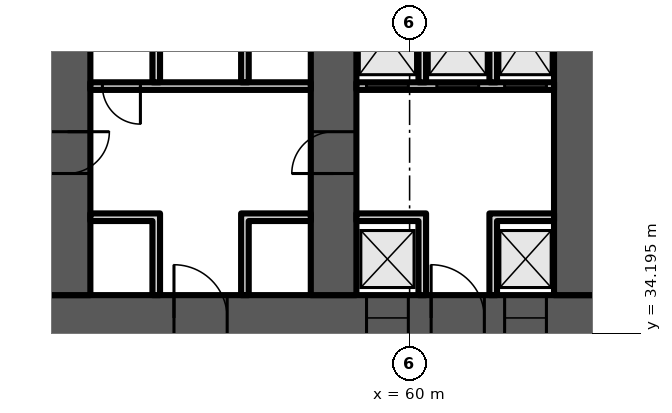
"""IFC4 building model, lengths in metres.
Left out: names, types, materials, properties, quantities, classifications, styles, units other than length and angle.
Written with IfcOpenShell. Run it as: python <this file> out.ifc"""

import sys

from ifc_helpers import new_model, si_unit, direction, frame, frame_2d, origin, place, context, subcontext, project, spatial, polyline, rectangle, outline, extrude, element, fill, save


model = new_model("IFC4")
c1 = context("Model", 3, precision=1e-05, world=origin(), true_north=direction((0.0, 1.0)))
c2 = subcontext(c1, "Body", "Model", "MODEL_VIEW")
j1 = project(units=[si_unit("LENGTHUNIT", "METRE"), si_unit("PLANEANGLEUNIT", "RADIAN")], contexts=[c1])
p1 = place(None, origin())
s1 = spatial("IfcSite", under=j1, at=p1, CompositionType="ELEMENT")
p2 = place(p1, origin())
s2 = spatial("IfcBuilding", under=s1, at=p2, CompositionType="ELEMENT")
p3 = place(p2, frame((0.0, 0.0, 55.9)))
s3 = spatial("IfcBuildingStorey", under=s2, at=p3, CompositionType="ELEMENT", Elevation=55.9)
p4 = place(p3, frame((9.0, 34.6, 0.0), z_axis=(0.0, 0.0, 1.0), x_axis=(1.0, 0.0, 0.0)))
e1 = element("IfcWall", 1, at=p4, inside=s3, PredefinedType="SHEAR", context=c2, shape_type="SweptSolid", body=[
    extrude(rectangle(XDim=56.0, YDim=1.2, at=frame_2d((28.0, 0.0))), origin(), (0.0, 0.0, 1.0), 3.6),
])
p5 = place(p4, frame((3.3, 0.0, 0.0)))
e2 = element("IfcOpeningElement", 2, at=p5, cuts=e1, PredefinedType="OPENING", context=c2, shape_type="SweptSolid", body=[
    extrude(rectangle(XDim=1.0, YDim=2.1, at=frame_2d((0.5, 1.05))), frame((0.0, 0.61, 0.0), z_axis=(0.0, -1.0, 0.0), x_axis=(1.0, 0.0, 0.0)), (0.0, 0.0, 1.0), 1.22),
])
p6 = place(p4, frame((7.867, 0.0, 0.0)))
e3 = element("IfcOpeningElement", 3, at=p6, cuts=e1, PredefinedType="OPENING", context=c2, shape_type="SweptSolid", body=[
    extrude(rectangle(XDim=1.1, YDim=2.1, at=frame_2d((0.55, 1.05))), frame((0.0, 0.61, 0.0), z_axis=(0.0, -1.0, 0.0), x_axis=(1.0, 0.0, 0.0)), (0.0, 0.0, 1.0), 1.22),
])
p7 = place(p4, frame((12.033, 0.0, 0.0)))
e4 = element("IfcOpeningElement", 4, at=p7, cuts=e1, PredefinedType="OPENING", context=c2, shape_type="SweptSolid", body=[
    extrude(rectangle(XDim=1.1, YDim=2.1, at=frame_2d((0.55, 1.05))), frame((0.0, 0.61, 0.0), z_axis=(0.0, -1.0, 0.0), x_axis=(1.0, 0.0, 0.0)), (0.0, 0.0, 1.0), 1.22),
])
p8 = place(p4, frame((9.8, 0.0, 0.0)))
e5 = element("IfcOpeningElement", 5, at=p8, cuts=e1, PredefinedType="OPENING", context=c2, shape_type="SweptSolid", body=[
    extrude(rectangle(XDim=1.4, YDim=2.1, at=frame_2d((0.7, 1.05))), frame((0.0, 0.61, 0.0), z_axis=(0.0, -1.0, 0.0), x_axis=(1.0, 0.0, 0.0)), (0.0, 0.0, 1.0), 1.22),
])
p9 = place(p4, frame((14.65, 0.0, 0.0)))
e6 = element("IfcOpeningElement", 6, at=p9, cuts=e1, PredefinedType="OPENING", context=c2, shape_type="SweptSolid", body=[
    extrude(rectangle(XDim=1.2, YDim=2.1, at=frame_2d((0.6, 1.05))), frame((0.0, 0.61, 0.0), z_axis=(0.0, -1.0, 0.0), x_axis=(1.0, 0.0, 0.0)), (0.0, 0.0, 1.0), 1.22),
])
p10 = place(p4, frame((21.867, 0.0, 0.0)))
e7 = element("IfcOpeningElement", 7, at=p10, cuts=e1, PredefinedType="OPENING", context=c2, shape_type="SweptSolid", body=[
    extrude(rectangle(XDim=1.1, YDim=2.1, at=frame_2d((0.55, 1.05))), frame((0.0, 0.61, 0.0), z_axis=(0.0, -1.0, 0.0), x_axis=(1.0, 0.0, 0.0)), (0.0, 0.0, 1.0), 1.22),
])
p11 = place(p4, frame((26.033, 0.0, 0.0)))
e8 = element("IfcOpeningElement", 8, at=p11, cuts=e1, PredefinedType="OPENING", context=c2, shape_type="SweptSolid", body=[
    extrude(rectangle(XDim=1.1, YDim=2.1, at=frame_2d((0.55, 1.05))), frame((0.0, 0.61, 0.0), z_axis=(0.0, -1.0, 0.0), x_axis=(1.0, 0.0, 0.0)), (0.0, 0.0, 1.0), 1.22),
])
p12 = place(p4, frame((23.8, 0.0, 0.0)))
e9 = element("IfcOpeningElement", 9, at=p12, cuts=e1, PredefinedType="OPENING", context=c2, shape_type="SweptSolid", body=[
    extrude(rectangle(XDim=1.4, YDim=2.1, at=frame_2d((0.7, 1.05))), frame((0.0, 0.61, 0.0), z_axis=(0.0, -1.0, 0.0), x_axis=(1.0, 0.0, 0.0)), (0.0, 0.0, 1.0), 1.22),
])
p13 = place(p4, frame((28.867, 0.0, 0.0)))
e10 = element("IfcOpeningElement", 10, at=p13, cuts=e1, PredefinedType="OPENING", context=c2, shape_type="SweptSolid", body=[
    extrude(rectangle(XDim=1.1, YDim=2.1, at=frame_2d((0.55, 1.05))), frame((0.0, 0.61, 0.0), z_axis=(0.0, -1.0, 0.0), x_axis=(1.0, 0.0, 0.0)), (0.0, 0.0, 1.0), 1.22),
])
p14 = place(p4, frame((33.033, 0.0, 0.0)))
e11 = element("IfcOpeningElement", 11, at=p14, cuts=e1, PredefinedType="OPENING", context=c2, shape_type="SweptSolid", body=[
    extrude(rectangle(XDim=1.1, YDim=2.1, at=frame_2d((0.55, 1.05))), frame((0.0, 0.61, 0.0), z_axis=(0.0, -1.0, 0.0), x_axis=(1.0, 0.0, 0.0)), (0.0, 0.0, 1.0), 1.22),
])
p15 = place(p4, frame((40.15, 0.0, 0.0)))
e12 = element("IfcOpeningElement", 12, at=p15, cuts=e1, PredefinedType="OPENING", context=c2, shape_type="SweptSolid", body=[
    extrude(rectangle(XDim=1.2, YDim=2.1, at=frame_2d((0.6, 1.05))), frame((0.0, 0.61, 0.0), z_axis=(0.0, -1.0, 0.0), x_axis=(1.0, 0.0, 0.0)), (0.0, 0.0, 1.0), 1.22),
])
p16 = place(p4, frame((44.8, 0.0, 0.0)))
e13 = element("IfcOpeningElement", 13, at=p16, cuts=e1, PredefinedType="OPENING", context=c2, shape_type="SweptSolid", body=[
    extrude(rectangle(XDim=1.4, YDim=2.1, at=frame_2d((0.7, 1.05))), frame((0.0, 0.61, 0.0), z_axis=(0.0, -1.0, 0.0), x_axis=(1.0, 0.0, 0.0)), (0.0, 0.0, 1.0), 1.22),
])
p17 = place(p4, frame((49.867, 0.0, 0.0)))
e14 = element("IfcOpeningElement", 14, at=p17, cuts=e1, PredefinedType="OPENING", context=c2, shape_type="SweptSolid", body=[
    extrude(rectangle(XDim=1.1, YDim=2.1, at=frame_2d((0.55, 1.05))), frame((0.0, 0.61, 0.0), z_axis=(0.0, -1.0, 0.0), x_axis=(1.0, 0.0, 0.0)), (0.0, 0.0, 1.0), 1.22),
])
p18 = place(p4, frame((53.5, 0.0, 0.0)))
e15 = element("IfcOpeningElement", 15, at=p18, cuts=e1, PredefinedType="OPENING", context=c2, shape_type="SweptSolid", body=[
    extrude(rectangle(XDim=1.1, YDim=2.1, at=frame_2d((0.55, 1.05))), frame((0.0, 0.61, 0.0), z_axis=(0.0, -1.0, 0.0), x_axis=(1.0, 0.0, 0.0)), (0.0, 0.0, 1.0), 1.22),
])
p19 = place(p4, frame((51.567, 0.0, 0.0)))
e16 = element("IfcOpeningElement", 16, at=p19, cuts=e1, PredefinedType="OPENING", context=c2, shape_type="SweptSolid", body=[
    extrude(rectangle(XDim=1.4, YDim=2.1, at=frame_2d((0.7, 1.05))), frame((0.0, 0.61, 0.0), z_axis=(0.0, -1.0, 0.0), x_axis=(1.0, 0.0, 0.0)), (0.0, 0.0, 1.0), 1.22),
])
p20 = place(p3, frame((51.0, 35.2, 0.0), z_axis=(0.0, 0.0, 1.0), x_axis=(0.0, 1.0, 0.0)))
e17 = element("IfcWall", 17, at=p20, inside=s3, PredefinedType="SHEAR", context=c2, shape_type="SweptSolid", body=[
    extrude(rectangle(XDim=13.555, YDim=1.2, at=frame_2d((6.778, 0.0))), origin(), (0.0, 0.0, 1.0), 3.6),
])
p21 = place(p20, frame((3.2, 0.0, 0.0)))
e18 = element("IfcOpeningElement", 18, at=p21, cuts=e17, PredefinedType="OPENING", context=c2, shape_type="SweptSolid", body=[
    extrude(rectangle(XDim=1.1, YDim=2.1, at=frame_2d((0.55, 1.05))), frame((0.0, 0.61, 0.0), z_axis=(0.0, -1.0, 0.0), x_axis=(1.0, 0.0, 0.0)), (0.0, 0.0, 1.0), 1.22),
])
p22 = place(p3, frame((58.0, 35.2, 0.0), z_axis=(0.0, 0.0, 1.0), x_axis=(0.0, 1.0, 0.0)))
e19 = element("IfcWall", 19, at=p22, inside=s3, PredefinedType="SHEAR", context=c2, shape_type="SweptSolid", body=[
    extrude(rectangle(XDim=12.943, YDim=1.2, at=frame_2d((6.471, 0.0))), origin(), (0.0, 0.0, 1.0), 3.6),
])
p23 = place(p22, frame((10.134, 0.0, 0.0)))
e20 = element("IfcOpeningElement", 20, at=p23, cuts=e19, PredefinedType="OPENING", context=c2, shape_type="SweptSolid", body=[
    extrude(rectangle(XDim=1.0, YDim=2.1, at=frame_2d((0.5, 1.05))), frame((0.0, 0.61, 0.0), z_axis=(0.0, -1.0, 0.0), x_axis=(1.0, 0.0, 0.0)), (0.0, 0.0, 1.0), 1.22),
])
p24 = place(p22, frame((3.2, 0.0, 0.0)))
e21 = element("IfcOpeningElement", 21, at=p24, cuts=e19, PredefinedType="OPENING", context=c2, shape_type="SweptSolid", body=[
    extrude(rectangle(XDim=1.1, YDim=2.1, at=frame_2d((0.55, 1.05))), frame((0.0, 0.61, 0.0), z_axis=(0.0, -1.0, 0.0), x_axis=(1.0, 0.0, 0.0)), (0.0, 0.0, 1.0), 1.22),
])
p25 = place(p3, frame((64.4, 35.2, 0.0), z_axis=(0.0, 0.0, 1.0), x_axis=(0.0, 1.0, 0.0)))
e22 = element("IfcWall", 22, at=p25, inside=s3, PredefinedType="SHEAR", context=c2, shape_type="SweptSolid", body=[
    extrude(rectangle(XDim=12.383, YDim=1.2, at=frame_2d((6.191, 0.0))), origin(), (0.0, 0.0, 1.0), 3.6),
])
p26 = place(p3, frame((51.6, 40.7, 0.0), z_axis=(0.0, 0.0, 1.0), x_axis=(1.0, 0.0, 0.0)))
e23 = element("IfcWall", 23, at=p26, inside=s3, PredefinedType="PARTITIONING", context=c2, shape_type="SweptSolid", body=[
    extrude(rectangle(XDim=5.8, YDim=0.2, at=frame_2d((2.9, 0.0))), origin(), (0.0, 0.0, 1.0), 3.2),
])
p27 = place(p26, frame((0.317, 0.0, 0.0)))
e24 = element("IfcOpeningElement", 24, at=p27, cuts=e23, PredefinedType="OPENING", context=c2, shape_type="SweptSolid", body=[
    extrude(rectangle(XDim=1.0, YDim=2.1, at=frame_2d((0.5, 1.05))), frame((0.0, 0.11, 0.0), z_axis=(0.0, -1.0, 0.0), x_axis=(1.0, 0.0, 0.0)), (0.0, 0.0, 1.0), 0.22),
])
p28 = place(p3, origin())
e25 = element("IfcWall", 25, at=p28, inside=s3, PredefinedType="PARTITIONING", context=c2, shape_type="SweptSolid", body=[
    extrude(outline(polyline([(53.233, 37.15), (51.6, 37.15), (51.6, 37.35), (53.233, 37.35), (53.433, 37.35), (53.433, 35.2), (53.233, 35.2), (53.233, 37.15)])), origin(), (0.0, 0.0, 1.0), 3.2),
])
p29 = place(p3, origin())
e26 = element("IfcWall", 26, at=p29, inside=s3, PredefinedType="PARTITIONING", context=c2, shape_type="SweptSolid", body=[
    extrude(outline(polyline([(55.567, 37.35), (55.767, 37.35), (57.4, 37.35), (57.4, 37.15), (55.767, 37.15), (55.767, 35.2), (55.567, 35.2), (55.567, 37.35)])), origin(), (0.0, 0.0, 1.0), 3.2),
])
p30 = place(p3, origin())
e27 = element("IfcWall", 27, at=p30, inside=s3, PredefinedType="PARTITIONING", context=c2, shape_type="SweptSolid", body=[
    extrude(outline(polyline([(53.233, 40.8), (53.233, 43.8), (53.433, 43.8), (53.433, 40.8), (53.233, 40.8)])), origin(), (0.0, 0.0, 1.0), 3.2),
])
p31 = place(p3, origin())
e28 = element("IfcWall", 28, at=p31, inside=s3, PredefinedType="PARTITIONING", context=c2, shape_type="SweptSolid", body=[
    extrude(outline(polyline([(55.567, 40.8), (55.567, 43.8), (55.767, 43.8), (55.767, 40.8), (55.567, 40.8)])), origin(), (0.0, 0.0, 1.0), 3.2),
])
p32 = place(p3, frame((58.6, 40.7, 0.0), z_axis=(0.0, 0.0, 1.0), x_axis=(1.0, 0.0, 0.0)))
e29 = element("IfcWall", 29, at=p32, inside=s3, PredefinedType="PARTITIONING", context=c2, shape_type="SweptSolid", body=[
    extrude(rectangle(XDim=5.2, YDim=0.2, at=frame_2d((2.6, 0.0))), origin(), (0.0, 0.0, 1.0), 3.2),
])
p33 = place(p32, frame((0.267, 0.0, 0.0)))
e30 = element("IfcOpeningElement", 30, at=p33, cuts=e29, PredefinedType="OPENING", context=c2, shape_type="SweptSolid", body=[
    extrude(rectangle(XDim=1.1, YDim=2.1, at=frame_2d((0.55, 1.05))), frame((0.0, 0.11, 0.0), z_axis=(0.0, -1.0, 0.0), x_axis=(1.0, 0.0, 0.0)), (0.0, 0.0, 1.0), 0.22),
])
p34 = place(p32, frame((2.117, 0.0, 0.0)))
e31 = element("IfcOpeningElement", 31, at=p34, cuts=e29, PredefinedType="OPENING", context=c2, shape_type="SweptSolid", body=[
    extrude(rectangle(XDim=1.1, YDim=2.1, at=frame_2d((0.55, 1.05))), frame((0.0, 0.11, 0.0), z_axis=(0.0, -1.0, 0.0), x_axis=(1.0, 0.0, 0.0)), (0.0, 0.0, 1.0), 0.22),
])
p35 = place(p32, frame((3.9, 0.0, 0.0)))
e32 = element("IfcOpeningElement", 32, at=p35, cuts=e29, PredefinedType="OPENING", context=c2, shape_type="SweptSolid", body=[
    extrude(rectangle(XDim=1.1, YDim=2.1, at=frame_2d((0.55, 1.05))), frame((0.0, 0.11, 0.0), z_axis=(0.0, -1.0, 0.0), x_axis=(1.0, 0.0, 0.0)), (0.0, 0.0, 1.0), 0.22),
])
p36 = place(p3, origin())
e33 = element("IfcWall", 33, at=p36, inside=s3, PredefinedType="PARTITIONING", context=c2, shape_type="SweptSolid", body=[
    extrude(outline(polyline([(60.233, 37.15), (58.6, 37.15), (58.6, 37.35), (60.233, 37.35), (60.433, 37.35), (60.433, 35.2), (60.233, 35.2), (60.233, 37.15)])), origin(), (0.0, 0.0, 1.0), 3.2),
])
p37 = place(p3, origin())
e34 = element("IfcWall", 34, at=p37, inside=s3, PredefinedType="PARTITIONING", context=c2, shape_type="SweptSolid", body=[
    extrude(outline(polyline([(62.1, 37.35), (62.3, 37.35), (63.8, 37.35), (63.8, 37.15), (62.3, 37.15), (62.3, 35.2), (62.1, 35.2), (62.1, 37.35)])), origin(), (0.0, 0.0, 1.0), 3.2),
])
p38 = place(p3, origin())
e35 = element("IfcWall", 35, at=p38, inside=s3, PredefinedType="PARTITIONING", context=c2, shape_type="SweptSolid", body=[
    extrude(outline(polyline([(60.433, 40.8), (60.233, 40.8), (60.233, 43.8), (58.6, 43.8), (58.6, 44.0), (63.8, 44.0), (63.8, 43.8), (62.3, 43.8), (62.3, 40.8), (62.1, 40.8), (62.1, 43.8), (60.433, 43.8), (60.433, 40.8)])), origin(), (0.0, 0.0, 1.0), 3.2),
])
p39 = place(p16, origin())
e36 = element("IfcDoor", 36, at=p39, inside=s3, OperationType="DOUBLE_DOOR_SINGLE_SWING", PredefinedType="DOOR", context=c2, shape_type="SweptSolid", body=[
    extrude(rectangle(XDim=1.4, YDim=2.1, at=frame_2d((0.7, 1.05))), frame((0.0, 0.025, 0.0), z_axis=(0.0, -1.0, 0.0), x_axis=(1.0, 0.0, 0.0)), (0.0, 0.0, 1.0), 0.05),
])
fill(e13, e36)
p40 = place(p27, origin())
e37 = element("IfcDoor", 37, at=p40, inside=s3, OperationType="SINGLE_SWING_RIGHT", PredefinedType="DOOR", context=c2, shape_type="SweptSolid", body=[
    extrude(rectangle(XDim=1.0, YDim=2.1, at=frame_2d((0.5, 1.05))), frame((0.0, 0.025, 0.0), z_axis=(0.0, -1.0, 0.0), x_axis=(1.0, 0.0, 0.0)), (0.0, 0.0, 1.0), 0.05),
])
fill(e24, e37)
p41 = place(p17, origin())
e38 = element("IfcDoor", 38, at=p41, inside=s3, OperationType="DOUBLE_DOOR_SLIDING", PredefinedType="DOOR", context=c2, shape_type="SweptSolid", body=[
    extrude(rectangle(XDim=1.1, YDim=2.1, at=frame_2d((0.55, 1.05))), frame((0.0, 0.025, 0.0), z_axis=(0.0, -1.0, 0.0), x_axis=(1.0, 0.0, 0.0)), (0.0, 0.0, 1.0), 0.05),
])
fill(e14, e38)
p42 = place(p18, origin())
e39 = element("IfcDoor", 39, at=p42, inside=s3, OperationType="DOUBLE_DOOR_SLIDING", PredefinedType="DOOR", context=c2, shape_type="SweptSolid", body=[
    extrude(rectangle(XDim=1.1, YDim=2.1, at=frame_2d((0.55, 1.05))), frame((0.0, 0.025, 0.0), z_axis=(0.0, -1.0, 0.0), x_axis=(1.0, 0.0, 0.0)), (0.0, 0.0, 1.0), 0.05),
])
fill(e15, e39)
p43 = place(p19, origin())
e40 = element("IfcDoor", 40, at=p43, inside=s3, OperationType="DOUBLE_DOOR_SINGLE_SWING", PredefinedType="DOOR", context=c2, shape_type="SweptSolid", body=[
    extrude(rectangle(XDim=1.4, YDim=2.1, at=frame_2d((0.7, 1.05))), frame((0.0, 0.025, 0.0), z_axis=(0.0, -1.0, 0.0), x_axis=(1.0, 0.0, 0.0)), (0.0, 0.0, 1.0), 0.05),
])
fill(e16, e40)
p44 = place(p33, origin())
e41 = element("IfcDoor", 41, at=p44, inside=s3, OperationType="DOUBLE_DOOR_SLIDING", PredefinedType="DOOR", context=c2, shape_type="SweptSolid", body=[
    extrude(rectangle(XDim=1.1, YDim=2.1, at=frame_2d((0.55, 1.05))), frame((0.0, 0.025, 0.0), z_axis=(0.0, -1.0, 0.0), x_axis=(1.0, 0.0, 0.0)), (0.0, 0.0, 1.0), 0.05),
])
fill(e30, e41)
p45 = place(p34, origin())
e42 = element("IfcDoor", 42, at=p45, inside=s3, OperationType="DOUBLE_DOOR_SLIDING", PredefinedType="DOOR", context=c2, shape_type="SweptSolid", body=[
    extrude(rectangle(XDim=1.1, YDim=2.1, at=frame_2d((0.55, 1.05))), frame((0.0, 0.025, 0.0), z_axis=(0.0, -1.0, 0.0), x_axis=(1.0, 0.0, 0.0)), (0.0, 0.0, 1.0), 0.05),
])
fill(e31, e42)
p46 = place(p35, origin())
e43 = element("IfcDoor", 43, at=p46, inside=s3, OperationType="DOUBLE_DOOR_SLIDING", PredefinedType="DOOR", context=c2, shape_type="SweptSolid", body=[
    extrude(rectangle(XDim=1.1, YDim=2.1, at=frame_2d((0.55, 1.05))), frame((0.0, 0.025, 0.0), z_axis=(0.0, -1.0, 0.0), x_axis=(1.0, 0.0, 0.0)), (0.0, 0.0, 1.0), 0.05),
])
fill(e32, e43)
p47 = place(p21, origin())
e44 = element("IfcDoor", 44, at=p47, inside=s3, OperationType="SINGLE_SWING_RIGHT", PredefinedType="DOOR", context=c2, shape_type="SweptSolid", body=[
    extrude(rectangle(XDim=1.1, YDim=2.1, at=frame_2d((0.55, 1.05))), frame((0.0, 0.025, 0.0), z_axis=(0.0, -1.0, 0.0), x_axis=(1.0, 0.0, 0.0)), (0.0, 0.0, 1.0), 0.05),
])
fill(e18, e44)
p48 = place(p24, origin())
e45 = element("IfcDoor", 45, at=p48, inside=s3, OperationType="SINGLE_SWING_LEFT", PredefinedType="DOOR", context=c2, shape_type="SweptSolid", body=[
    extrude(rectangle(XDim=1.1, YDim=2.1, at=frame_2d((0.55, 1.05))), frame((0.0, 0.025, 0.0), z_axis=(0.0, -1.0, 0.0), x_axis=(1.0, 0.0, 0.0)), (0.0, 0.0, 1.0), 0.05),
])
fill(e21, e45)
save(model, sys.argv[1])
